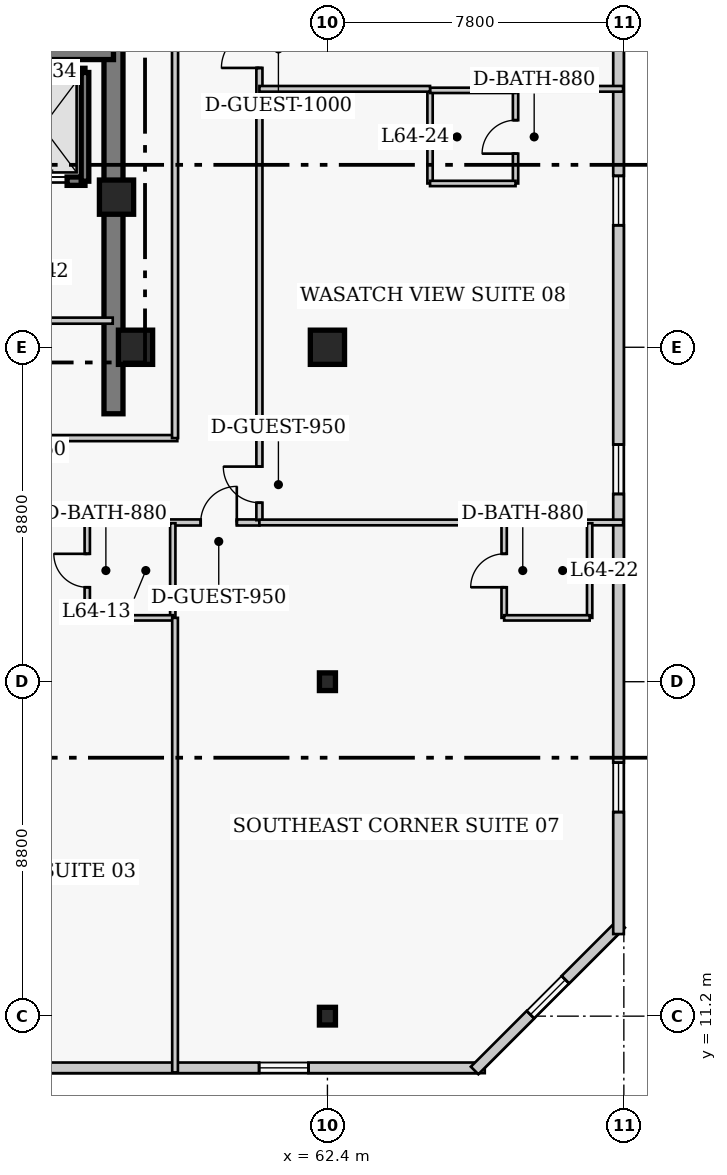
"""IFC4 building model, lengths in metres.
Left out: names, types, materials, properties, quantities, classifications, styles, units other than length and angle.
Written with IfcOpenShell. Run it as: python <this file> out.ifc"""

import sys

from ifc_helpers import new_model, si_unit, direction, frame, frame_2d, origin, origin_2d, place, context, subcontext, project, spatial, rectangle, i_section, extrude, element, fill, save


model = new_model("IFC4")
c1 = context("Model", 3, precision=1e-05, world=origin(), true_north=direction((0.0, 1.0)))
c2 = subcontext(c1, "Body", "Model", "MODEL_VIEW")
j1 = project(units=[si_unit("LENGTHUNIT", "METRE"), si_unit("PLANEANGLEUNIT", "RADIAN")], contexts=[c1])
p1 = place(None, origin())
s1 = spatial("IfcSite", under=j1, at=p1, CompositionType="ELEMENT")
p2 = place(p1, origin())
s2 = spatial("IfcBuilding", under=s1, at=p2, CompositionType="ELEMENT")
p3 = place(p2, frame((0.0, 0.0, 257.4)))
s3 = spatial("IfcBuildingStorey", under=s2, at=p3, CompositionType="ELEMENT", Elevation=257.4)
p4 = place(p3, frame((56.77, 27.05, 0.0), z_axis=(0.0, 0.0, 1.0), x_axis=(0.0, 1.0, 0.0)))
e1 = element("IfcWall", 1, at=p4, inside=s3, PredefinedType="SHEAR", context=c2, shape_type="SweptSolid", body=[
    extrude(rectangle(XDim=13.52, YDim=0.5, at=frame_2d((6.76, 0.0))), origin(), (0.0, 0.0, 1.0), 4.0),
])
p5 = place(p3, frame((48.45, 36.52, 0.0), z_axis=(0.0, 0.0, 1.0), x_axis=(1.0, 0.0, 0.0)))
e2 = element("IfcWall", 2, at=p5, inside=s3, PredefinedType="SHEAR", context=c2, shape_type="SweptSolid", body=[
    extrude(rectangle(XDim=8.32, YDim=0.3, at=frame_2d((4.16, 0.0))), origin(), (0.0, 0.0, 1.0), 4.0),
])
for number, where, z_axis, x_axis in (
    (3, (62.4, 11.2, 0.0), (0.0, 0.0, 1.0), (1.0, 0.0, 0.0)),
    (4, (62.4, 20.0, 0.0), (0.0, 0.0, 1.0), (1.0, 0.0, 0.0)),
):
    element("IfcColumn", number, at=place(p3, frame(where, z_axis=z_axis, x_axis=x_axis)), inside=s3, PredefinedType="COLUMN", context=c2, shape_type="SweptSolid", body=[
        extrude(i_section(OverallWidth=0.422, OverallDepth=0.465, WebThickness=0.045, FlangeThickness=0.073, FilletRadius=0.017, at=origin_2d()), origin(), (0.0, 0.0, 1.0), 4.0),
    ])
for number, where, z_axis, x_axis in (
    (5, (62.4, 28.8, 0.0), (0.0, 0.0, 1.0), (1.0, 0.0, 0.0)),
    (6, (57.35, 28.8, 0.0), (0.0, 0.0, 1.0), (1.0, 0.0, 0.0)),
    (7, (56.85, 32.75, 0.0), (0.0, 0.0, 1.0), (1.0, 0.0, 0.0)),
):
    element("IfcColumn", number, at=place(p3, frame(where, z_axis=z_axis, x_axis=x_axis)), inside=s3, PredefinedType="COLUMN", context=c2, shape_type="SweptSolid", body=[
        extrude(rectangle(XDim=0.9, YDim=0.9, at=origin_2d()), origin(), (0.0, 0.0, 1.0), 4.0),
    ])
p6 = place(p3, frame((41.71, 9.84, 0.0), z_axis=(0.0, 0.0, 1.0), x_axis=(1.0, 0.0, 0.0)))
e8 = element("IfcWall", 8, at=p6, inside=s3, PredefinedType="SOLIDWALL", context=c2, shape_type="SweptSolid", body=[
    extrude(rectangle(XDim=24.83, YDim=0.28, at=frame_2d((12.415, 0.0))), origin(), (0.0, 0.0, 1.0), 3.76),
])
p7 = place(p6, frame((3.488, 0.0, 0.85)))
e9 = element("IfcOpeningElement", 9, at=p7, cuts=e8, PredefinedType="OPENING", context=c2, shape_type="SweptSolid", body=[
    extrude(rectangle(XDim=1.3, YDim=1.7, at=frame_2d((0.65, 0.85))), frame((0.0, 0.15, 0.0), z_axis=(0.0, -1.0, 0.0), x_axis=(1.0, 0.0, 0.0)), (0.0, 0.0, 1.0), 0.3),
])
p8 = place(p6, frame((11.115, 0.0, 0.85)))
e10 = element("IfcOpeningElement", 10, at=p8, cuts=e8, PredefinedType="OPENING", context=c2, shape_type="SweptSolid", body=[
    extrude(rectangle(XDim=1.3, YDim=1.7, at=frame_2d((0.65, 0.85))), frame((0.0, 0.15, 0.0), z_axis=(0.0, -1.0, 0.0), x_axis=(1.0, 0.0, 0.0)), (0.0, 0.0, 1.0), 0.3),
])
p9 = place(p6, frame((18.892, 0.0, 0.85)))
e11 = element("IfcOpeningElement", 11, at=p9, cuts=e8, PredefinedType="OPENING", context=c2, shape_type="SweptSolid", body=[
    extrude(rectangle(XDim=1.3, YDim=1.7, at=frame_2d((0.65, 0.85))), frame((0.0, 0.15, 0.0), z_axis=(0.0, -1.0, 0.0), x_axis=(1.0, 0.0, 0.0)), (0.0, 0.0, 1.0), 0.3),
])
p10 = place(p3, frame((66.273, 9.771, 0.0), z_axis=(0.0, 0.0, 1.0), x_axis=(0.707129162587, 0.707084399077, 0.0)))
e12 = element("IfcWall", 12, at=p10, inside=s3, PredefinedType="SOLIDWALL", context=c2, shape_type="SweptSolid", body=[
    extrude(rectangle(XDim=5.454, YDim=0.28, at=frame_2d((2.727, 0.0))), origin(), (0.0, 0.0, 1.0), 3.76),
])
p11 = place(p10, frame((2.077, 0.0, 0.85)))
e13 = element("IfcOpeningElement", 13, at=p11, cuts=e12, PredefinedType="OPENING", context=c2, shape_type="SweptSolid", body=[
    extrude(rectangle(XDim=1.3, YDim=1.7, at=frame_2d((0.65, 0.85))), frame((0.0, 0.15, 0.0), z_axis=(0.0, -1.0, 0.0), x_axis=(1.0, 0.0, 0.0)), (0.0, 0.0, 1.0), 0.3),
])
p12 = place(p3, frame((70.06, 13.36, 0.0), z_axis=(0.0, 0.0, 1.0), x_axis=(0.0, 1.0, 0.0)))
e14 = element("IfcWall", 14, at=p12, inside=s3, PredefinedType="SOLIDWALL", context=c2, shape_type="SweptSolid", body=[
    extrude(rectangle(XDim=30.88, YDim=0.28, at=frame_2d((15.44, 0.0))), origin(), (0.0, 0.0, 1.0), 3.76),
])
p13 = place(p12, frame((3.21, 0.0, 0.85)))
e15 = element("IfcOpeningElement", 15, at=p13, cuts=e14, PredefinedType="OPENING", context=c2, shape_type="SweptSolid", body=[
    extrude(rectangle(XDim=1.3, YDim=1.7, at=frame_2d((0.65, 0.85))), frame((0.0, 0.15, 0.0), z_axis=(0.0, -1.0, 0.0), x_axis=(1.0, 0.0, 0.0)), (0.0, 0.0, 1.0), 0.3),
])
p14 = place(p12, frame((11.58, 0.0, 0.85)))
e16 = element("IfcOpeningElement", 16, at=p14, cuts=e14, PredefinedType="OPENING", context=c2, shape_type="SweptSolid", body=[
    extrude(rectangle(XDim=1.3, YDim=1.7, at=frame_2d((0.65, 0.85))), frame((0.0, 0.15, 0.0), z_axis=(0.0, -1.0, 0.0), x_axis=(1.0, 0.0, 0.0)), (0.0, 0.0, 1.0), 0.3),
])
p15 = place(p12, frame((18.65, 0.0, 0.85)))
e17 = element("IfcOpeningElement", 17, at=p15, cuts=e14, PredefinedType="OPENING", context=c2, shape_type="SweptSolid", body=[
    extrude(rectangle(XDim=1.3, YDim=1.7, at=frame_2d((0.65, 0.85))), frame((0.0, 0.15, 0.0), z_axis=(0.0, -1.0, 0.0), x_axis=(1.0, 0.0, 0.0)), (0.0, 0.0, 1.0), 0.3),
])
p16 = place(p12, frame((26.37, 0.0, 0.85)))
e18 = element("IfcOpeningElement", 18, at=p16, cuts=e14, PredefinedType="OPENING", context=c2, shape_type="SweptSolid", body=[
    extrude(rectangle(XDim=1.3, YDim=1.7, at=frame_2d((0.65, 0.85))), frame((0.0, 0.15, 0.0), z_axis=(0.0, -1.0, 0.0), x_axis=(1.0, 0.0, 0.0)), (0.0, 0.0, 1.0), 0.3),
])
p17 = place(p3, frame((53.6, 36.03, 0.0), z_axis=(0.0, 0.0, 1.0), x_axis=(1.0, 0.0, 0.0)))
e19 = element("IfcWall", 19, at=p17, inside=s3, PredefinedType="SHEAR", context=c2, shape_type="SweptSolid", body=[
    extrude(rectangle(XDim=2.42, YDim=0.22, at=frame_2d((1.21, 0.0))), origin(), (0.0, 0.0, 1.0), 4.0),
])
p18 = place(p3, frame((53.6, 33.17, 0.0), z_axis=(0.0, 0.0, 1.0), x_axis=(1.0, 0.0, 0.0)))
e20 = element("IfcWall", 20, at=p18, inside=s3, PredefinedType="SHEAR", context=c2, shape_type="SweptSolid", body=[
    extrude(rectangle(XDim=2.42, YDim=0.22, at=frame_2d((1.21, 0.0))), origin(), (0.0, 0.0, 1.0), 4.0),
])
p19 = place(p18, frame((0.65, 0.0, 0.0)))
e21 = element("IfcOpeningElement", 21, at=p19, cuts=e20, PredefinedType="OPENING", context=c2, shape_type="SweptSolid", body=[
    extrude(rectangle(XDim=1.3, YDim=2.15, at=frame_2d((0.65, 1.075))), frame((0.0, 0.12, 0.0), z_axis=(0.0, -1.0, 0.0), x_axis=(1.0, 0.0, 0.0)), (0.0, 0.0, 1.0), 0.24),
])
p20 = place(p3, frame((56.02, 33.17, 0.0), z_axis=(0.0, 0.0, 1.0), x_axis=(0.0, 1.0, 0.0)))
e22 = element("IfcWall", 22, at=p20, inside=s3, PredefinedType="SHEAR", context=c2, shape_type="SweptSolid", body=[
    extrude(rectangle(XDim=2.86, YDim=0.2, at=frame_2d((1.43, 0.0))), origin(), (0.0, 0.0, 1.0), 4.0),
])
p21 = place(p3, frame((51.12, 29.5, 0.0), z_axis=(0.0, 0.0, 1.0), x_axis=(1.0, 0.0, 0.0)))
e23 = element("IfcWall", 23, at=p21, inside=s3, PredefinedType="PARTITIONING", context=c2, shape_type="SweptSolid", body=[
    extrude(rectangle(XDim=5.63, YDim=0.16, at=frame_2d((2.815, 0.0))), origin(), (0.0, 0.0, 1.0), 3.76),
])
p22 = place(p3, frame((35.85, 26.41, 0.0), z_axis=(0.0, 0.0, 1.0), x_axis=(1.0, 0.0, 0.0)))
e24 = element("IfcWall", 24, at=p22, inside=s3, PredefinedType="PARTITIONING", context=c2, shape_type="SweptSolid", body=[
    extrude(rectangle(XDim=22.6, YDim=0.16, at=frame_2d((11.3, 0.0))), origin(), (0.0, 0.0, 1.0), 3.76),
])
p23 = place(p22, frame((4.55, 0.0, 0.0)))
e25 = element("IfcOpeningElement", 25, at=p23, cuts=e24, PredefinedType="OPENING", context=c2, shape_type="SweptSolid", body=[
    extrude(rectangle(XDim=1.0, YDim=2.15, at=frame_2d((0.5, 1.075))), frame((0.0, 0.09, 0.0), z_axis=(0.0, -1.0, 0.0), x_axis=(1.0, 0.0, 0.0)), (0.0, 0.0, 1.0), 0.18),
])
p24 = place(p22, frame((12.05, 0.0, 0.0)))
e26 = element("IfcOpeningElement", 26, at=p24, cuts=e24, PredefinedType="OPENING", context=c2, shape_type="SweptSolid", body=[
    extrude(rectangle(XDim=1.0, YDim=2.15, at=frame_2d((0.5, 1.075))), frame((0.0, 0.09, 0.0), z_axis=(0.0, -1.0, 0.0), x_axis=(1.0, 0.0, 0.0)), (0.0, 0.0, 1.0), 0.18),
])
p25 = place(p3, frame((35.8, 24.19, 0.0), z_axis=(0.0, 0.0, 1.0), x_axis=(1.0, 0.0, 0.0)))
e27 = element("IfcWall", 27, at=p25, inside=s3, PredefinedType="PARTITIONING", context=c2, shape_type="SweptSolid", body=[
    extrude(rectangle(XDim=24.81, YDim=0.16, at=frame_2d((12.405, 0.0))), origin(), (0.0, 0.0, 1.0), 3.76),
])
p26 = place(p25, frame((2.115, 0.0, 0.0)))
e28 = element("IfcOpeningElement", 28, at=p26, cuts=e27, PredefinedType="OPENING", context=c2, shape_type="SweptSolid", body=[
    extrude(rectangle(XDim=0.95, YDim=2.1, at=frame_2d((0.475, 1.05))), frame((0.0, 0.09, 0.0), z_axis=(0.0, -1.0, 0.0), x_axis=(1.0, 0.0, 0.0)), (0.0, 0.0, 1.0), 0.18),
])
p27 = place(p25, frame((11.345, 0.0, 0.0)))
e29 = element("IfcOpeningElement", 29, at=p27, cuts=e27, PredefinedType="OPENING", context=c2, shape_type="SweptSolid", body=[
    extrude(rectangle(XDim=1.0, YDim=2.15, at=frame_2d((0.5, 1.075))), frame((0.0, 0.09, 0.0), z_axis=(0.0, -1.0, 0.0), x_axis=(1.0, 0.0, 0.0)), (0.0, 0.0, 1.0), 0.18),
])
p28 = place(p25, frame((17.47, 0.0, 0.0)))
e30 = element("IfcOpeningElement", 30, at=p28, cuts=e27, PredefinedType="OPENING", context=c2, shape_type="SweptSolid", body=[
    extrude(rectangle(XDim=0.95, YDim=2.1, at=frame_2d((0.475, 1.05))), frame((0.0, 0.09, 0.0), z_axis=(0.0, -1.0, 0.0), x_axis=(1.0, 0.0, 0.0)), (0.0, 0.0, 1.0), 0.18),
])
p29 = place(p25, frame((23.265, 0.0, 0.0)))
e31 = element("IfcOpeningElement", 31, at=p29, cuts=e27, PredefinedType="OPENING", context=c2, shape_type="SweptSolid", body=[
    extrude(rectangle(XDim=0.95, YDim=2.1, at=frame_2d((0.475, 1.05))), frame((0.0, 0.09, 0.0), z_axis=(0.0, -1.0, 0.0), x_axis=(1.0, 0.0, 0.0)), (0.0, 0.0, 1.0), 0.18),
])
p30 = place(p3, frame((60.61, 24.25, 0.0), z_axis=(0.0, 0.0, 1.0), x_axis=(0.0, 1.0, 0.0)))
e32 = element("IfcWall", 32, at=p30, inside=s3, PredefinedType="PARTITIONING", context=c2, shape_type="SweptSolid", body=[
    extrude(rectangle(XDim=16.4, YDim=0.16, at=frame_2d((8.2, 0.0))), origin(), (0.0, 0.0, 1.0), 3.76),
])
p31 = place(p30, frame((0.46, 0.0, 0.0)))
e33 = element("IfcOpeningElement", 33, at=p31, cuts=e32, PredefinedType="OPENING", context=c2, shape_type="SweptSolid", body=[
    extrude(rectangle(XDim=0.95, YDim=2.1, at=frame_2d((0.475, 1.05))), frame((0.0, 0.09, 0.0), z_axis=(0.0, -1.0, 0.0), x_axis=(1.0, 0.0, 0.0)), (0.0, 0.0, 1.0), 0.18),
])
p32 = place(p30, frame((11.9, 0.0, 0.0)))
e34 = element("IfcOpeningElement", 34, at=p32, cuts=e32, PredefinedType="OPENING", context=c2, shape_type="SweptSolid", body=[
    extrude(rectangle(XDim=1.0, YDim=2.15, at=frame_2d((0.5, 1.075))), frame((0.0, 0.09, 0.0), z_axis=(0.0, -1.0, 0.0), x_axis=(1.0, 0.0, 0.0)), (0.0, 0.0, 1.0), 0.18),
])
p33 = place(p3, frame((58.39, 26.41, 0.0), z_axis=(0.0, 0.0, 1.0), x_axis=(0.0, 1.0, 0.0)))
e35 = element("IfcWall", 35, at=p33, inside=s3, PredefinedType="PARTITIONING", context=c2, shape_type="SweptSolid", body=[
    extrude(rectangle(XDim=14.24, YDim=0.16, at=frame_2d((7.12, 0.0))), origin(), (0.0, 0.0, 1.0), 3.76),
])
p34 = place(p3, frame((56.08, 21.68, 0.0), z_axis=(0.0, 0.0, 1.0), x_axis=(0.0, 1.0, 0.0)))
e36 = element("IfcWall", 36, at=p34, inside=s3, PredefinedType="PLUMBINGWALL", context=c2, shape_type="SweptSolid", body=[
    extrude(rectangle(XDim=2.49, YDim=0.14, at=frame_2d((1.245, 0.0))), origin(), (0.0, 0.0, 1.0), 3.76),
])
p35 = place(p34, frame((0.805, 0.0, 0.0)))
e37 = element("IfcOpeningElement", 37, at=p35, cuts=e36, PredefinedType="OPENING", context=c2, shape_type="SweptSolid", body=[
    extrude(rectangle(XDim=0.88, YDim=2.05, at=frame_2d((0.44, 1.025))), frame((0.0, 0.08, 0.0), z_axis=(0.0, -1.0, 0.0), x_axis=(1.0, 0.0, 0.0)), (0.0, 0.0, 1.0), 0.16),
])
p36 = place(p3, frame((58.33, 21.68, 0.0), z_axis=(0.0, 0.0, 1.0), x_axis=(0.0, 1.0, 0.0)))
e38 = element("IfcWall", 38, at=p36, inside=s3, PredefinedType="PLUMBINGWALL", context=c2, shape_type="SweptSolid", body=[
    extrude(rectangle(XDim=2.49, YDim=0.14, at=frame_2d((1.245, 0.0))), origin(), (0.0, 0.0, 1.0), 3.76),
])
p37 = place(p3, frame((56.08, 21.68, 0.0), z_axis=(0.0, 0.0, 1.0), x_axis=(1.0, 0.0, 0.0)))
e39 = element("IfcWall", 39, at=p37, inside=s3, PredefinedType="PLUMBINGWALL", context=c2, shape_type="SweptSolid", body=[
    extrude(rectangle(XDim=2.25, YDim=0.14, at=frame_2d((1.125, 0.0))), origin(), (0.0, 0.0, 1.0), 3.76),
])
p38 = place(p3, frame((58.39, 9.72, 0.0), z_axis=(0.0, 0.0, 1.0), x_axis=(0.0, 1.0, 0.0)))
e40 = element("IfcWall", 40, at=p38, inside=s3, PredefinedType="PARTITIONING", context=c2, shape_type="SweptSolid", body=[
    extrude(rectangle(XDim=11.96, YDim=0.15, at=frame_2d((5.98, 0.0))), origin(), (0.0, 0.0, 1.0), 3.356),
])
p39 = place(p3, frame((60.61, 24.19, 0.0), z_axis=(0.0, 0.0, 1.0), x_axis=(1.0, 0.0, 0.0)))
e41 = element("IfcWall", 41, at=p39, inside=s3, PredefinedType="PARTITIONING", context=c2, shape_type="SweptSolid", body=[
    extrude(rectangle(XDim=9.57, YDim=0.15, at=frame_2d((4.785, 0.0))), origin(), (0.0, 0.0, 1.0), 3.76),
])
p40 = place(p3, frame((67.05, 21.68, 0.0), z_axis=(0.0, 0.0, 1.0), x_axis=(0.0, 1.0, 0.0)))
e42 = element("IfcWall", 42, at=p40, inside=s3, PredefinedType="PLUMBINGWALL", context=c2, shape_type="SweptSolid", body=[
    extrude(rectangle(XDim=2.49, YDim=0.14, at=frame_2d((1.245, 0.0))), origin(), (0.0, 0.0, 1.0), 3.76),
])
p41 = place(p40, frame((0.805, 0.0, 0.0)))
e43 = element("IfcOpeningElement", 43, at=p41, cuts=e42, PredefinedType="OPENING", context=c2, shape_type="SweptSolid", body=[
    extrude(rectangle(XDim=0.88, YDim=2.05, at=frame_2d((0.44, 1.025))), frame((0.0, 0.08, 0.0), z_axis=(0.0, -1.0, 0.0), x_axis=(1.0, 0.0, 0.0)), (0.0, 0.0, 1.0), 0.16),
])
p42 = place(p3, frame((69.3, 21.68, 0.0), z_axis=(0.0, 0.0, 1.0), x_axis=(0.0, 1.0, 0.0)))
e44 = element("IfcWall", 44, at=p42, inside=s3, PredefinedType="PLUMBINGWALL", context=c2, shape_type="SweptSolid", body=[
    extrude(rectangle(XDim=2.49, YDim=0.14, at=frame_2d((1.245, 0.0))), origin(), (0.0, 0.0, 1.0), 3.76),
])
p43 = place(p3, frame((67.05, 21.68, 0.0), z_axis=(0.0, 0.0, 1.0), x_axis=(1.0, 0.0, 0.0)))
e45 = element("IfcWall", 45, at=p43, inside=s3, PredefinedType="PLUMBINGWALL", context=c2, shape_type="SweptSolid", body=[
    extrude(rectangle(XDim=2.25, YDim=0.14, at=frame_2d((1.125, 0.0))), origin(), (0.0, 0.0, 1.0), 3.76),
])
p44 = place(p3, frame((65.1, 33.11, 0.0), z_axis=(0.0, 0.0, 1.0), x_axis=(0.0, 1.0, 0.0)))
e46 = element("IfcWall", 46, at=p44, inside=s3, PredefinedType="PLUMBINGWALL", context=c2, shape_type="SweptSolid", body=[
    extrude(rectangle(XDim=2.45, YDim=0.14, at=frame_2d((1.225, 0.0))), origin(), (0.0, 0.0, 1.0), 3.76),
])
p45 = place(p3, frame((67.35, 33.11, 0.0), z_axis=(0.0, 0.0, 1.0), x_axis=(0.0, 1.0, 0.0)))
e47 = element("IfcWall", 47, at=p45, inside=s3, PredefinedType="PLUMBINGWALL", context=c2, shape_type="SweptSolid", body=[
    extrude(rectangle(XDim=2.45, YDim=0.14, at=frame_2d((1.225, 0.0))), origin(), (0.0, 0.0, 1.0), 3.76),
])
p46 = place(p45, frame((0.785, 0.0, 0.0)))
e48 = element("IfcOpeningElement", 48, at=p46, cuts=e47, PredefinedType="OPENING", context=c2, shape_type="SweptSolid", body=[
    extrude(rectangle(XDim=0.88, YDim=2.05, at=frame_2d((0.44, 1.025))), frame((0.0, 0.08, 0.0), z_axis=(0.0, -1.0, 0.0), x_axis=(1.0, 0.0, 0.0)), (0.0, 0.0, 1.0), 0.16),
])
for number, where, z_axis, x_axis in (
    (49, (65.1, 33.11, 0.0), (0.0, 0.0, 1.0), (1.0, 0.0, 0.0)),
    (50, (65.1, 35.56, 0.0), (0.0, 0.0, 1.0), (1.0, 0.0, 0.0)),
):
    element("IfcWall", number, at=place(p3, frame(where, z_axis=z_axis, x_axis=x_axis)), inside=s3, PredefinedType="PLUMBINGWALL", context=c2, shape_type="SweptSolid", body=[
        extrude(rectangle(XDim=2.25, YDim=0.14, at=frame_2d((1.125, 0.0))), origin(), (0.0, 0.0, 1.0), 3.76),
    ])
p47 = place(p3, frame((60.61, 35.6, 0.0), z_axis=(0.0, 0.0, 1.0), x_axis=(1.0, 0.0, 0.0)))
e51 = element("IfcWall", 51, at=p47, inside=s3, PredefinedType="PARTITIONING", context=c2, shape_type="SweptSolid", body=[
    extrude(rectangle(XDim=4.49, YDim=0.15, at=frame_2d((2.245, 0.0))), origin(), (0.0, 0.0, 1.0), 3.76),
])
p48 = place(p3, frame((67.35, 35.6, 0.0), z_axis=(0.0, 0.0, 1.0), x_axis=(1.0, 0.0, 0.0)))
e52 = element("IfcWall", 52, at=p48, inside=s3, PredefinedType="PARTITIONING", context=c2, shape_type="SweptSolid", body=[
    extrude(rectangle(XDim=2.83, YDim=0.15, at=frame_2d((1.415, 0.0))), origin(), (0.0, 0.0, 1.0), 3.76),
])
p49 = place(p9, origin())
e53 = element("IfcWindow", 53, at=p49, inside=s3, PartitioningType="SINGLE_PANEL", PredefinedType="WINDOW", context=c2, shape_type="SweptSolid", body=[
    extrude(rectangle(XDim=1.3, YDim=1.7, at=frame_2d((0.65, 0.85))), frame((0.0, 0.03, 0.0), z_axis=(0.0, -1.0, 0.0), x_axis=(1.0, 0.0, 0.0)), (0.0, 0.0, 1.0), 0.06),
])
fill(e11, e53)
p50 = place(p11, origin())
e54 = element("IfcWindow", 54, at=p50, inside=s3, PartitioningType="SINGLE_PANEL", PredefinedType="WINDOW", context=c2, shape_type="SweptSolid", body=[
    extrude(rectangle(XDim=1.3, YDim=1.7, at=frame_2d((0.65, 0.85))), frame((0.0, 0.03, 0.0), z_axis=(0.0, -1.0, 0.0), x_axis=(1.0, 0.0, 0.0)), (0.0, 0.0, 1.0), 0.06),
])
fill(e13, e54)
p51 = place(p13, origin())
e55 = element("IfcWindow", 55, at=p51, inside=s3, PartitioningType="SINGLE_PANEL", PredefinedType="WINDOW", context=c2, shape_type="SweptSolid", body=[
    extrude(rectangle(XDim=1.3, YDim=1.7, at=frame_2d((0.65, 0.85))), frame((0.0, 0.03, 0.0), z_axis=(0.0, -1.0, 0.0), x_axis=(1.0, 0.0, 0.0)), (0.0, 0.0, 1.0), 0.06),
])
fill(e15, e55)
p52 = place(p14, origin())
e56 = element("IfcWindow", 56, at=p52, inside=s3, PartitioningType="SINGLE_PANEL", PredefinedType="WINDOW", context=c2, shape_type="SweptSolid", body=[
    extrude(rectangle(XDim=1.3, YDim=1.7, at=frame_2d((0.65, 0.85))), frame((0.0, 0.03, 0.0), z_axis=(0.0, -1.0, 0.0), x_axis=(1.0, 0.0, 0.0)), (0.0, 0.0, 1.0), 0.06),
])
fill(e16, e56)
p53 = place(p15, origin())
e57 = element("IfcWindow", 57, at=p53, inside=s3, PartitioningType="SINGLE_PANEL", PredefinedType="WINDOW", context=c2, shape_type="SweptSolid", body=[
    extrude(rectangle(XDim=1.3, YDim=1.7, at=frame_2d((0.65, 0.85))), frame((0.0, 0.03, 0.0), z_axis=(0.0, -1.0, 0.0), x_axis=(1.0, 0.0, 0.0)), (0.0, 0.0, 1.0), 0.06),
])
fill(e17, e57)
p54 = place(p19, origin())
e58 = element("IfcDoor", 58, at=p54, inside=s3, OperationType="DOUBLE_DOOR_SLIDING", PredefinedType="DOOR", context=c2, shape_type="SweptSolid", body=[
    extrude(rectangle(XDim=1.3, YDim=2.15, at=frame_2d((0.65, 1.075))), frame((0.0, 0.025, 0.0), z_axis=(0.0, -1.0, 0.0), x_axis=(1.0, 0.0, 0.0)), (0.0, 0.0, 1.0), 0.05),
])
fill(e21, e58)
p55 = place(p35, origin())
e59 = element("IfcDoor", 59, at=p55, inside=s3, OperationType="SINGLE_SWING_RIGHT", PredefinedType="DOOR", context=c2, shape_type="SweptSolid", body=[
    extrude(rectangle(XDim=0.88, YDim=2.05, at=frame_2d((0.44, 1.025))), frame((0.0, 0.025, 0.0), z_axis=(0.0, -1.0, 0.0), x_axis=(1.0, 0.0, 0.0)), (0.0, 0.0, 1.0), 0.05),
])
fill(e37, e59)
p56 = place(p41, origin())
e60 = element("IfcDoor", 60, at=p56, inside=s3, OperationType="SINGLE_SWING_LEFT", PredefinedType="DOOR", context=c2, shape_type="SweptSolid", body=[
    extrude(rectangle(XDim=0.88, YDim=2.05, at=frame_2d((0.44, 1.025))), frame((0.0, 0.025, 0.0), z_axis=(0.0, -1.0, 0.0), x_axis=(1.0, 0.0, 0.0)), (0.0, 0.0, 1.0), 0.05),
])
fill(e43, e60)
p57 = place(p29, origin())
e61 = element("IfcDoor", 61, at=p57, inside=s3, OperationType="SINGLE_SWING_RIGHT", PredefinedType="DOOR", context=c2, shape_type="SweptSolid", body=[
    extrude(rectangle(XDim=0.95, YDim=2.1, at=frame_2d((0.475, 1.05))), frame((0.0, 0.025, 0.0), z_axis=(0.0, -1.0, 0.0), x_axis=(1.0, 0.0, 0.0)), (0.0, 0.0, 1.0), 0.05),
])
fill(e31, e61)
p58 = place(p46, origin())
e62 = element("IfcDoor", 62, at=p58, inside=s3, OperationType="SINGLE_SWING_LEFT", PredefinedType="DOOR", context=c2, shape_type="SweptSolid", body=[
    extrude(rectangle(XDim=0.88, YDim=2.05, at=frame_2d((0.44, 1.025))), frame((0.0, 0.025, 0.0), z_axis=(0.0, -1.0, 0.0), x_axis=(1.0, 0.0, 0.0)), (0.0, 0.0, 1.0), 0.05),
])
fill(e48, e62)
p59 = place(p31, origin())
e63 = element("IfcDoor", 63, at=p59, inside=s3, OperationType="SINGLE_SWING_RIGHT", PredefinedType="DOOR", context=c2, shape_type="SweptSolid", body=[
    extrude(rectangle(XDim=0.95, YDim=2.1, at=frame_2d((0.475, 1.05))), frame((0.0, 0.025, 0.0), z_axis=(0.0, -1.0, 0.0), x_axis=(1.0, 0.0, 0.0)), (0.0, 0.0, 1.0), 0.05),
])
fill(e33, e63)
p60 = place(p32, origin())
e64 = element("IfcDoor", 64, at=p60, inside=s3, OperationType="SINGLE_SWING_LEFT", PredefinedType="DOOR", context=c2, shape_type="SweptSolid", body=[
    extrude(rectangle(XDim=1.0, YDim=2.15, at=frame_2d((0.5, 1.075))), frame((0.0, 0.025, 0.0), z_axis=(0.0, -1.0, 0.0), x_axis=(1.0, 0.0, 0.0)), (0.0, 0.0, 1.0), 0.05),
])
fill(e34, e64)
save(model, sys.argv[1])
